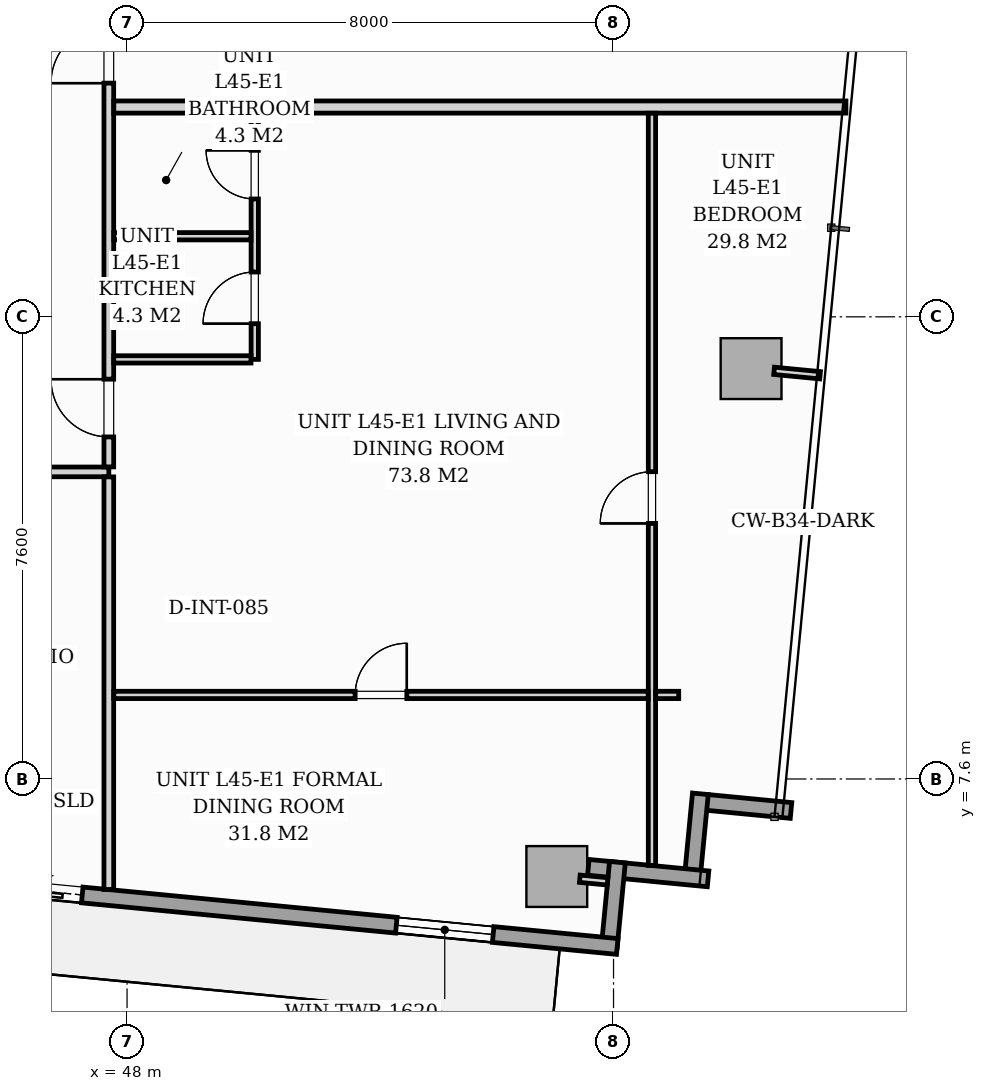
"""IFC4 building model, lengths in metres.
Left out: names, types, materials, properties, quantities, classifications, styles, units other than length and angle.
Written with IfcOpenShell. Run it as: python <this file> out.ifc"""

import sys

from ifc_helpers import new_model, si_unit, direction, frame, frame_2d, origin, origin_2d, place, context, subcontext, project, spatial, rectangle, extrude, source, transform, mapped, element, fill, save


model = new_model("IFC4")
c1 = context("Model", 3, precision=1e-05, world=origin(), true_north=direction((0.0, 1.0)))
c2 = subcontext(c1, "Body", "Model", "MODEL_VIEW")
j1 = project(units=[si_unit("LENGTHUNIT", "METRE"), si_unit("PLANEANGLEUNIT", "RADIAN")], contexts=[c1])
p1 = place(None, origin())
s1 = spatial("IfcSite", under=j1, at=p1, CompositionType="ELEMENT")
p2 = place(p1, origin())
s2 = spatial("IfcBuilding", under=s1, at=p2, CompositionType="ELEMENT")
p3 = place(p2, frame((0.0, 0.0, 156.6)))
s3 = spatial("IfcBuildingStorey", under=s2, at=p3, CompositionType="ELEMENT", Elevation=156.6)
m1 = source(origin(), c2, "Body", "SweptSolid", [
    extrude(rectangle(XDim=1.0, YDim=1.0, at=origin_2d()), origin(), (0.0, 0.0, 1.0), 3.196),
])
for number, where, z_axis, x_axis in (
    (1, (55.067, 5.996, 0.002), (0.0, 0.0, 1.0), (0.995, -0.096, 0.0)),
    (2, (58.262, 14.348, 0.002), (0.0, 0.0, 1.0), (0.995, -0.096, 0.0)),
):
    element("IfcColumn", number, at=place(p3, frame(where, z_axis=z_axis, x_axis=x_axis)), inside=s3, PredefinedType="COLUMN", context=c2, shape_type="MappedRepresentation", body=[
        mapped(m1, transform((0.0, 0.0, 0.0), scale=1.0)),
    ])
for number, where, z_axis, x_axis in (
    (3, (58.919, 7.082, 0.0), (0.0, 0.0, 1.0), (-0.995, 0.096, 0.0)),
    (4, (57.428, 7.356, 0.0), (0.0, 0.0, 1.0), (-0.096, -0.995, 0.0)),
):
    element("IfcWall", number, at=place(p3, frame(where, z_axis=z_axis, x_axis=x_axis)), inside=s3, PredefinedType="STANDARD", context=c2, shape_type="SweptSolid", body=[
        extrude(rectangle(XDim=1.395, YDim=0.26, at=frame_2d((0.697, 0.0))), origin(), (0.0, 0.0, 1.0), 2.94),
    ])
p4 = place(p3, frame((57.555, 5.958, 0.0), z_axis=(0.0, 0.0, 1.0), x_axis=(-0.995401789159, 0.095787672171, 0.0)))
e5 = element("IfcWall", 5, at=p4, inside=s3, PredefinedType="STANDARD", context=c2, shape_type="SweptSolid", body=[
    extrude(rectangle(XDim=1.978, YDim=0.26, at=frame_2d((0.989, 0.0))), origin(), (0.0, 0.0, 1.0), 2.94),
])
p5 = place(p3, frame((56.064, 6.232, 0.0), z_axis=(0.0, 0.0, 1.0), x_axis=(-0.09589913835, -0.995391056452, 0.0)))
e6 = element("IfcWall", 6, at=p5, inside=s3, PredefinedType="STANDARD", context=c2, shape_type="SweptSolid", body=[
    extrude(rectangle(XDim=1.395, YDim=0.26, at=frame_2d((0.698, 0.0))), origin(), (0.0, 0.0, 1.0), 2.94),
])
p6 = place(p3, frame((56.061, 4.845, 0.0), z_axis=(0.0, 0.0, 1.0), x_axis=(-0.995395976631, 0.095848055311, 0.0)))
e7 = element("IfcWall", 7, at=p6, inside=s3, PredefinedType="STANDARD", context=c2, shape_type="SweptSolid", body=[
    extrude(rectangle(XDim=17.01, YDim=0.26, at=frame_2d((8.505, 0.0))), origin(), (0.0, 0.0, 1.0), 2.94),
])
p7 = place(p6, frame((8.839, 0.0, 0.0)))
e8 = element("IfcOpeningElement", 8, at=p7, cuts=e7, PredefinedType="OPENING", context=c2, shape_type="SweptSolid", body=[
    extrude(rectangle(XDim=1.8, YDim=2.06, at=frame_2d((0.9, 1.03))), frame((0.0, 0.14, 0.0), z_axis=(0.0, -1.0, 0.0), x_axis=(1.0, 0.0, 0.0)), (0.0, 0.0, 1.0), 0.28),
])
p8 = place(p6, frame((2.05, 0.0, 0.65)))
e9 = element("IfcOpeningElement", 9, at=p8, cuts=e7, PredefinedType="OPENING", context=c2, shape_type="SweptSolid", body=[
    extrude(rectangle(XDim=1.6, YDim=1.5, at=frame_2d((0.8, 0.75))), frame((0.0, 0.14, 0.0), z_axis=(0.0, -1.0, 0.0), x_axis=(1.0, 0.0, 0.0)), (0.0, 0.0, 1.0), 0.28),
])
p9 = place(p3, frame((22.05, 12.65, 0.0), z_axis=(0.0, 0.0, 1.0), x_axis=(1.0, 0.0, 0.0)))
e10 = element("IfcWall", 10, at=p9, inside=s3, PredefinedType="PARTITIONING", context=c2, shape_type="SweptSolid", body=[
    extrude(rectangle(XDim=25.65, YDim=0.16, at=frame_2d((12.825, 0.0))), origin(), (0.0, 0.0, 1.0), 2.94),
])
p10 = place(p9, frame((1.736, 0.0, 0.0)))
e11 = element("IfcOpeningElement", 11, at=p10, cuts=e10, PredefinedType="OPENING", context=c2, shape_type="SweptSolid", body=[
    extrude(rectangle(XDim=0.95, YDim=2.06, at=frame_2d((0.475, 1.03))), frame((0.0, 0.09, 0.0), z_axis=(0.0, -1.0, 0.0), x_axis=(1.0, 0.0, 0.0)), (0.0, 0.0, 1.0), 0.18),
])
p11 = place(p9, frame((10.3, 0.0, 0.0)))
e12 = element("IfcOpeningElement", 12, at=p11, cuts=e10, PredefinedType="OPENING", context=c2, shape_type="SweptSolid", body=[
    extrude(rectangle(XDim=0.95, YDim=2.06, at=frame_2d((0.475, 1.03))), frame((0.0, 0.09, 0.0), z_axis=(0.0, -1.0, 0.0), x_axis=(1.0, 0.0, 0.0)), (0.0, 0.0, 1.0), 0.18),
])
p12 = place(p9, frame((22.965, 0.0, 0.0)))
e13 = element("IfcOpeningElement", 13, at=p12, cuts=e10, PredefinedType="OPENING", context=c2, shape_type="SweptSolid", body=[
    extrude(rectangle(XDim=0.95, YDim=2.06, at=frame_2d((0.475, 1.03))), frame((0.0, 0.09, 0.0), z_axis=(0.0, -1.0, 0.0), x_axis=(1.0, 0.0, 0.0)), (0.0, 0.0, 1.0), 0.18),
])
p13 = place(p3, frame((47.7, 5.783, 0.0), z_axis=(0.0, 0.0, 1.0), x_axis=(0.0, 1.0, 0.0)))
e14 = element("IfcWall", 14, at=p13, inside=s3, PredefinedType="PARTITIONING", context=c2, shape_type="SweptSolid", body=[
    extrude(rectangle(XDim=6.785, YDim=0.16, at=frame_2d((3.393, 0.0))), origin(), (0.0, 0.0, 1.0), 2.94),
])
p14 = place(p3, frame((47.7, 12.732, 0.0), z_axis=(0.0, 0.0, 1.0), x_axis=(0.0, 1.0, 0.0)))
e15 = element("IfcWall", 15, at=p14, inside=s3, PredefinedType="PARTITIONING", context=c2, shape_type="SweptSolid", body=[
    extrude(rectangle(XDim=7.918, YDim=0.16, at=frame_2d((3.959, 0.0))), origin(), (0.0, 0.0, 1.0), 2.94),
])
p15 = place(p14, frame((0.493, 0.0, 0.0)))
e16 = element("IfcOpeningElement", 16, at=p15, cuts=e15, PredefinedType="OPENING", context=c2, shape_type="SweptSolid", body=[
    extrude(rectangle(XDim=0.95, YDim=2.06, at=frame_2d((0.475, 1.03))), frame((0.0, 0.09, 0.0), z_axis=(0.0, -1.0, 0.0), x_axis=(1.0, 0.0, 0.0)), (0.0, 0.0, 1.0), 0.18),
])
p16 = place(p14, frame((6.311, 0.0, 0.0)))
e17 = element("IfcOpeningElement", 17, at=p16, cuts=e15, PredefinedType="OPENING", context=c2, shape_type="SweptSolid", body=[
    extrude(rectangle(XDim=0.95, YDim=2.06, at=frame_2d((0.475, 1.03))), frame((0.0, 0.09, 0.0), z_axis=(0.0, -1.0, 0.0), x_axis=(1.0, 0.0, 0.0)), (0.0, 0.0, 1.0), 0.18),
])
p17 = place(p3, frame((47.782, 18.65, 0.0), z_axis=(0.0, 0.0, 1.0), x_axis=(1.0, 0.0, 0.0)))
e18 = element("IfcWall", 18, at=p17, inside=s3, PredefinedType="PARTITIONING", context=c2, shape_type="SweptSolid", body=[
    extrude(rectangle(XDim=12.04, YDim=0.2, at=frame_2d((6.02, 0.0))), origin(), (0.0, 0.0, 1.0), 2.94),
])
p18 = place(p3, frame((50.1, 14.5, 0.0), z_axis=(0.0, 0.0, 1.0), x_axis=(0.0, 1.0, 0.0)))
e19 = element("IfcWall", 19, at=p18, inside=s3, PredefinedType="PARTITIONING", context=c2, shape_type="SweptSolid", body=[
    extrude(rectangle(XDim=4.048, YDim=0.12, at=frame_2d((2.024, 0.0))), origin(), (0.0, 0.0, 1.0), 2.94),
])
p19 = place(p18, frame((0.587, 0.0, 0.0)))
e20 = element("IfcOpeningElement", 20, at=p19, cuts=e19, PredefinedType="OPENING", context=c2, shape_type="SweptSolid", body=[
    extrude(rectangle(XDim=0.85, YDim=2.05, at=frame_2d((0.425, 1.025))), frame((0.0, 0.07, 0.0), z_axis=(0.0, -1.0, 0.0), x_axis=(1.0, 0.0, 0.0)), (0.0, 0.0, 1.0), 0.14),
])
p20 = place(p18, frame((2.638, 0.0, 0.0)))
e21 = element("IfcOpeningElement", 21, at=p20, cuts=e19, PredefinedType="OPENING", context=c2, shape_type="SweptSolid", body=[
    extrude(rectangle(XDim=0.8, YDim=2.02, at=frame_2d((0.4, 1.01))), frame((0.0, 0.07, 0.0), z_axis=(0.0, -1.0, 0.0), x_axis=(1.0, 0.0, 0.0)), (0.0, 0.0, 1.0), 0.14),
])
p21 = place(p3, frame((47.782, 16.525, 0.0), z_axis=(0.0, 0.0, 1.0), x_axis=(1.0, 0.0, 0.0)))
e22 = element("IfcWall", 22, at=p21, inside=s3, PredefinedType="PARTITIONING", context=c2, shape_type="SweptSolid", body=[
    extrude(rectangle(XDim=2.256, YDim=0.12, at=frame_2d((1.128, 0.0))), origin(), (0.0, 0.0, 1.0), 2.063),
])
p22 = place(p3, frame((47.782, 14.5, 0.0), z_axis=(0.0, 0.0, 1.0), x_axis=(1.0, 0.0, 0.0)))
e23 = element("IfcWall", 23, at=p22, inside=s3, PredefinedType="PARTITIONING", context=c2, shape_type="SweptSolid", body=[
    extrude(rectangle(XDim=2.256, YDim=0.12, at=frame_2d((1.128, 0.0))), origin(), (0.0, 0.0, 1.0), 2.94),
])
p23 = place(p3, frame((56.632, 6.179, 0.0), z_axis=(0.0, 0.0, 1.0), x_axis=(0.0, 1.0, 0.0)))
e24 = element("IfcWall", 24, at=p23, inside=s3, PredefinedType="PARTITIONING", context=c2, shape_type="SweptSolid", body=[
    extrude(rectangle(XDim=12.369, YDim=0.12, at=frame_2d((6.185, 0.0))), origin(), (0.0, 0.0, 1.0), 2.94),
])
p24 = place(p23, frame((5.624, 0.0, 0.0)))
e25 = element("IfcOpeningElement", 25, at=p24, cuts=e24, PredefinedType="OPENING", context=c2, shape_type="SweptSolid", body=[
    extrude(rectangle(XDim=0.85, YDim=2.05, at=frame_2d((0.425, 1.025))), frame((0.0, 0.07, 0.0), z_axis=(0.0, -1.0, 0.0), x_axis=(1.0, 0.0, 0.0)), (0.0, 0.0, 1.0), 0.14),
])
p25 = place(p3, frame((47.782, 8.982, 0.0), z_axis=(0.0, 0.0, 1.0), x_axis=(1.0, 0.0, 0.0)))
e26 = element("IfcWall", 26, at=p25, inside=s3, PredefinedType="PARTITIONING", context=c2, shape_type="SweptSolid", body=[
    extrude(rectangle(XDim=8.788, YDim=0.12, at=frame_2d((4.394, 0.0))), origin(), (0.0, 0.0, 1.0), 2.94),
])
p26 = place(p25, frame((3.969, 0.0, 0.0)))
e27 = element("IfcOpeningElement", 27, at=p26, cuts=e26, PredefinedType="OPENING", context=c2, shape_type="SweptSolid", body=[
    extrude(rectangle(XDim=0.85, YDim=2.05, at=frame_2d((0.425, 1.025))), frame((0.0, 0.07, 0.0), z_axis=(0.0, -1.0, 0.0), x_axis=(1.0, 0.0, 0.0)), (0.0, 0.0, 1.0), 0.14),
])
p27 = place(p3, frame((56.694, 8.982, 0.0), z_axis=(0.0, 0.0, 1.0), x_axis=(1.0, 0.0, 0.0)))
e28 = element("IfcWall", 28, at=p27, inside=s3, PredefinedType="PARTITIONING", context=c2, shape_type="SweptSolid", body=[
    extrude(rectangle(XDim=0.378, YDim=0.12, at=frame_2d((0.189, 0.0))), origin(), (0.0, 0.0, 1.0), 2.94),
])
p28 = place(p3, frame((55.445, 5.96, 0.0), z_axis=(0.0, 0.0, 1.0), x_axis=(0.995384576284, -0.09596637586, 0.0)))
e29 = element("IfcWall", 29, at=p28, inside=s3, PredefinedType="PARTITIONING", context=c2, shape_type="SweptSolid", body=[
    extrude(rectangle(XDim=0.458, YDim=0.12, at=frame_2d((0.229, 0.0))), origin(), (0.0, 0.0, 1.0), 2.94),
])
p29 = place(p3, frame((58.64, 14.312, 0.0), z_axis=(0.0, 0.0, 1.0), x_axis=(0.995377786728, -0.096036772582, 0.0)))
e30 = element("IfcWall", 30, at=p29, inside=s3, PredefinedType="PARTITIONING", context=c2, shape_type="SweptSolid", body=[
    extrude(rectangle(XDim=0.76, YDim=0.12, at=frame_2d((0.38, 0.0))), origin(), (0.0, 0.0, 1.0), 2.94),
])
m2 = source(origin(), c2, "Body", "SweptSolid", [
    extrude(rectangle(XDim=1.8, YDim=2.06, at=frame_2d((0.9, 1.03))), frame((0.0, 0.025, 0.0), z_axis=(0.0, -1.0, 0.0), x_axis=(1.0, 0.0, 0.0)), (0.0, 0.0, 1.0), 0.05),
])
p30 = place(p7, origin())
e31 = element("IfcDoor", 31, at=p30, inside=s3, OperationType="SLIDING_TO_RIGHT", PredefinedType="DOOR", context=c2, shape_type="MappedRepresentation", body=[
    mapped(m2, transform((0.0, 0.0, 0.0), scale=1.0)),
])
fill(e8, e31)
m3 = source(origin(), c2, "Body", "SweptSolid", [
    extrude(rectangle(XDim=1.6, YDim=1.5, at=frame_2d((0.8, 0.75))), frame((0.0, 0.03, 0.0), z_axis=(0.0, -1.0, 0.0), x_axis=(1.0, 0.0, 0.0)), (0.0, 0.0, 1.0), 0.06),
])
p31 = place(p8, origin())
e32 = element("IfcWindow", 32, at=p31, inside=s3, PartitioningType="SINGLE_PANEL", PredefinedType="WINDOW", context=c2, shape_type="MappedRepresentation", body=[
    mapped(m3, transform((0.0, 0.0, 0.0), scale=1.0)),
])
fill(e9, e32)
m4 = source(origin(), c2, "Body", "SweptSolid", [
    extrude(rectangle(XDim=0.95, YDim=2.06, at=frame_2d((0.475, 1.03))), frame((0.0, 0.025, 0.0), z_axis=(0.0, -1.0, 0.0), x_axis=(1.0, 0.0, 0.0)), (0.0, 0.0, 1.0), 0.05),
])
p32 = place(p15, origin())
e33 = element("IfcDoor", 33, at=p32, inside=s3, OperationType="SINGLE_SWING_RIGHT", PredefinedType="DOOR", context=c2, shape_type="MappedRepresentation", body=[
    mapped(m4, transform((0.0, 0.0, 0.0), scale=1.0)),
])
fill(e16, e33)
m5 = source(origin(), c2, "Body", "SweptSolid", [
    extrude(rectangle(XDim=0.85, YDim=2.05, at=frame_2d((0.425, 1.025))), frame((0.0, 0.025, 0.0), z_axis=(0.0, -1.0, 0.0), x_axis=(1.0, 0.0, 0.0)), (0.0, 0.0, 1.0), 0.05),
])
p33 = place(p19, origin())
e34 = element("IfcDoor", 34, at=p33, inside=s3, OperationType="SINGLE_SWING_LEFT", PredefinedType="DOOR", context=c2, shape_type="MappedRepresentation", body=[
    mapped(m5, transform((0.0, 0.0, 0.0), scale=1.0)),
])
fill(e20, e34)
m6 = source(origin(), c2, "Body", "SweptSolid", [
    extrude(rectangle(XDim=0.8, YDim=2.02, at=frame_2d((0.4, 1.01))), frame((0.0, 0.025, 0.0), z_axis=(0.0, -1.0, 0.0), x_axis=(1.0, 0.0, 0.0)), (0.0, 0.0, 1.0), 0.05),
])
p34 = place(p20, origin())
e35 = element("IfcDoor", 35, at=p34, inside=s3, OperationType="SINGLE_SWING_RIGHT", PredefinedType="DOOR", context=c2, shape_type="MappedRepresentation", body=[
    mapped(m6, transform((0.0, 0.0, 0.0), scale=1.0)),
])
fill(e21, e35)
p35 = place(p24, origin())
e36 = element("IfcDoor", 36, at=p35, inside=s3, OperationType="SINGLE_SWING_LEFT", PredefinedType="DOOR", context=c2, shape_type="MappedRepresentation", body=[
    mapped(m5, transform((0.0, 0.0, 0.0), scale=1.0)),
])
fill(e25, e36)
p36 = place(p26, origin())
e37 = element("IfcDoor", 37, at=p36, inside=s3, OperationType="SINGLE_SWING_RIGHT", PredefinedType="DOOR", context=c2, shape_type="MappedRepresentation", body=[
    mapped(m5, transform((0.0, 0.0, 0.0), scale=1.0)),
])
fill(e27, e37)
p37 = place(p16, origin())
e38 = element("IfcDoor", 38, at=p37, inside=s3, OperationType="SINGLE_SWING_LEFT", PredefinedType="DOOR", context=c2, shape_type="MappedRepresentation", body=[
    mapped(m4, transform((0.0, 0.0, 0.0), scale=1.0)),
])
fill(e17, e38)
save(model, sys.argv[1])
